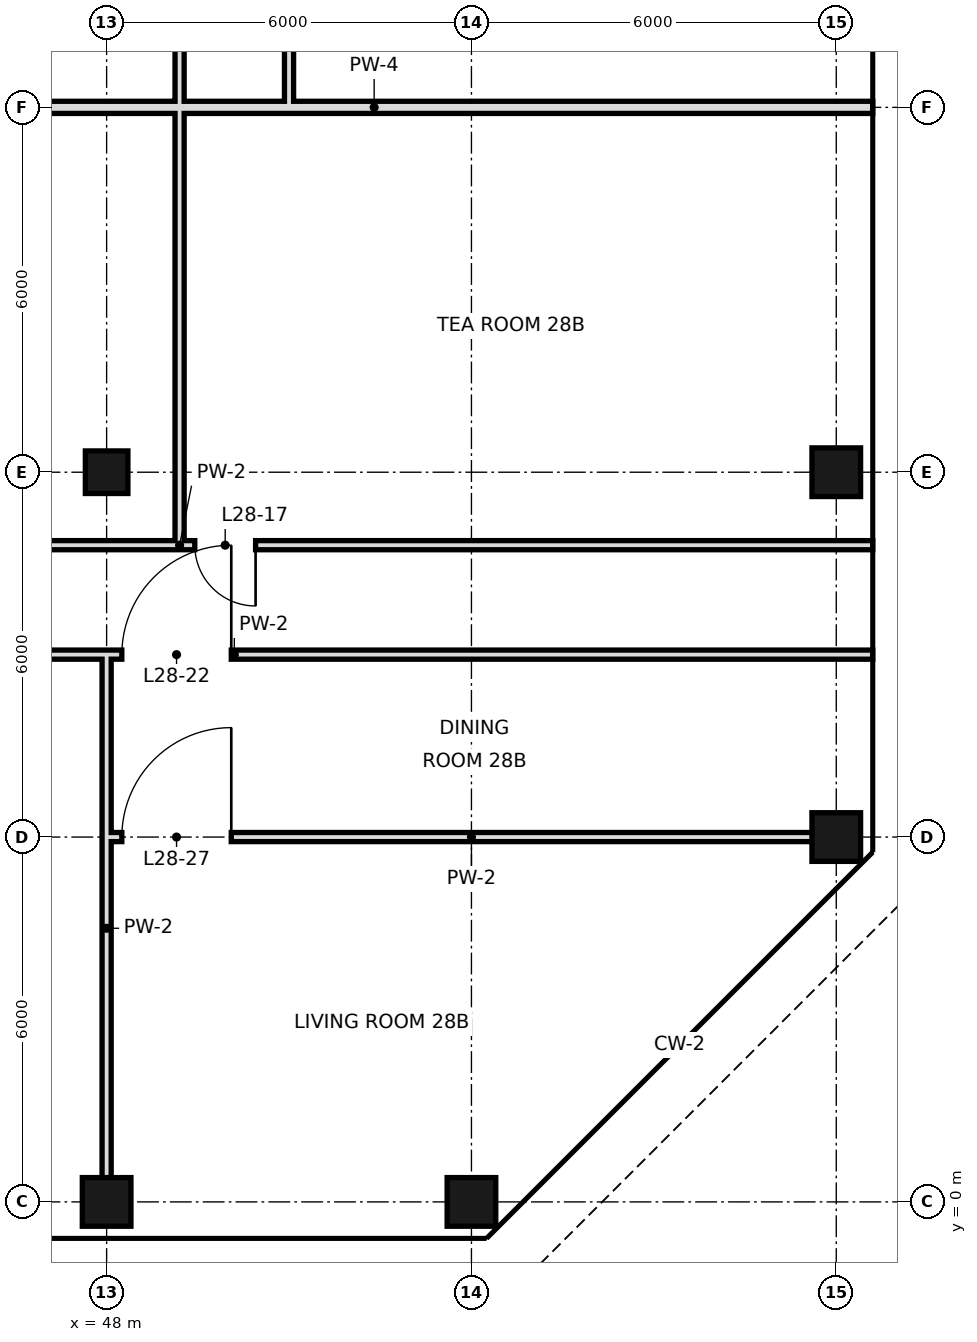
"""IFC4 building model, lengths in metres.
Left out: names, types, materials, properties, quantities, classifications, styles, units other than length and angle.
Written with IfcOpenShell. Run it as: python <this file> out.ifc"""

import sys

from ifc_helpers import new_model, si_unit, direction, frame, frame_2d, origin, origin_2d, place, context, subcontext, project, spatial, rectangle, hollow_rectangle, extrude, element, fill, save


model = new_model("IFC4")
c1 = context("Model", 3, precision=1e-05, world=origin(), true_north=direction((0.0, 1.0)))
c2 = subcontext(c1, "Body", "Model", "MODEL_VIEW")
j1 = project(units=[si_unit("LENGTHUNIT", "METRE"), si_unit("PLANEANGLEUNIT", "RADIAN")], contexts=[c1])
p1 = place(None, origin())
s1 = spatial("IfcSite", under=j1, at=p1, CompositionType="ELEMENT")
p2 = place(p1, origin())
s2 = spatial("IfcBuilding", under=s1, at=p2, CompositionType="ELEMENT")
p3 = place(p2, frame((0.0, 0.0, 126.8)))
s3 = spatial("IfcBuildingStorey", under=s2, at=p3, CompositionType="ELEMENT", Elevation=126.8)
p4 = place(p3, frame((48.0, 0.0, 0.0), z_axis=(0.0, 0.0, 1.0), x_axis=(1.0, 0.0, 0.0)))
e1 = element("IfcColumn", 1, at=p4, inside=s3, PredefinedType="COLUMN", context=c2, shape_type="SweptSolid", body=[
    extrude(hollow_rectangle(XDim=0.8, YDim=0.8, WallThickness=0.04, at=origin_2d()), origin(), (0.0, 0.0, 1.0), 3.6),
])
p5 = place(p3, frame((48.0, 12.0, 0.0), z_axis=(0.0, 0.0, 1.0), x_axis=(1.0, 0.0, 0.0)))
e2 = element("IfcColumn", 2, at=p5, inside=s3, PredefinedType="COLUMN", context=c2, shape_type="SweptSolid", body=[
    extrude(hollow_rectangle(XDim=0.7, YDim=0.7, WallThickness=0.036, at=origin_2d()), origin(), (0.0, 0.0, 1.0), 3.6),
])
for number, where, z_axis, x_axis in (
    (3, (54.0, 0.0, 0.0), (0.0, 0.0, 1.0), (1.0, 0.0, 0.0)),
    (4, (60.0, 6.0, 0.0), (0.0, 0.0, 1.0), (1.0, 0.0, 0.0)),
    (5, (60.0, 12.0, 0.0), (0.0, 0.0, 1.0), (1.0, 0.0, 0.0)),
):
    element("IfcColumn", number, at=place(p3, frame(where, z_axis=z_axis, x_axis=x_axis)), inside=s3, PredefinedType="COLUMN", context=c2, shape_type="SweptSolid", body=[
        extrude(hollow_rectangle(XDim=0.8, YDim=0.8, WallThickness=0.04, at=origin_2d()), origin(), (0.0, 0.0, 1.0), 3.6),
    ])
p6 = place(p3, frame((48.0, 0.0, 0.0), z_axis=(0.0, 0.0, 1.0), x_axis=(0.0, 1.0, 0.0)))
e6 = element("IfcWall", 6, at=p6, inside=s3, PredefinedType="PARTITIONING", context=c2, shape_type="SweptSolid", body=[
    extrude(rectangle(XDim=9.0, YDim=0.15, at=frame_2d((4.5, 0.0))), origin(), (0.0, 0.0, 1.0), 2.72),
])
p7 = place(p3, frame((49.2, 10.8, 0.0), z_axis=(0.0, 0.0, 1.0), x_axis=(0.0, 1.0, 0.0)))
e7 = element("IfcWall", 7, at=p7, inside=s3, PredefinedType="PARTITIONING", context=c2, shape_type="SweptSolid", body=[
    extrude(rectangle(XDim=20.4, YDim=0.15, at=frame_2d((10.2, 0.0))), origin(), (0.0, 0.0, 1.0), 3.42),
])
p8 = place(p7, frame((17.68, 0.0, 0.0)))
e8 = element("IfcOpeningElement", 8, at=p8, cuts=e7, PredefinedType="OPENING", context=c2, shape_type="SweptSolid", body=[
    extrude(rectangle(XDim=1.0, YDim=2.4, at=frame_2d((0.5, 1.2))), frame((0.0, 0.085, 0.0), z_axis=(0.0, -1.0, 0.0), x_axis=(1.0, 0.0, 0.0)), (0.0, 0.0, 1.0), 0.17),
])
p9 = place(p7, frame((9.88, 0.0, 0.0)))
e9 = element("IfcOpeningElement", 9, at=p9, cuts=e7, PredefinedType="OPENING", context=c2, shape_type="SweptSolid", body=[
    extrude(rectangle(XDim=1.0, YDim=2.4, at=frame_2d((0.5, 1.2))), frame((0.0, 0.085, 0.0), z_axis=(0.0, -1.0, 0.0), x_axis=(1.0, 0.0, 0.0)), (0.0, 0.0, 1.0), 0.17),
])
p10 = place(p3, frame((51.0, 18.0, 0.0), z_axis=(0.0, 0.0, 1.0), x_axis=(0.0, 1.0, 0.0)))
e10 = element("IfcWall", 10, at=p10, inside=s3, PredefinedType="PARTITIONING", context=c2, shape_type="SweptSolid", body=[
    extrude(rectangle(XDim=12.0, YDim=0.15, at=frame_2d((6.0, 0.0))), origin(), (0.0, 0.0, 1.0), 3.42),
])
p11 = place(p10, frame((2.84, 0.0, 0.0)))
e11 = element("IfcOpeningElement", 11, at=p11, cuts=e10, PredefinedType="OPENING", context=c2, shape_type="SweptSolid", body=[
    extrude(rectangle(XDim=1.8, YDim=2.4, at=frame_2d((0.9, 1.2))), frame((0.0, 0.085, 0.0), z_axis=(0.0, -1.0, 0.0), x_axis=(1.0, 0.0, 0.0)), (0.0, 0.0, 1.0), 0.17),
])
p12 = place(p10, frame((8.1, 0.0, 0.0)))
e12 = element("IfcOpeningElement", 12, at=p12, cuts=e10, PredefinedType="OPENING", context=c2, shape_type="SweptSolid", body=[
    extrude(rectangle(XDim=1.8, YDim=2.4, at=frame_2d((0.9, 1.2))), frame((0.0, 0.085, 0.0), z_axis=(0.0, -1.0, 0.0), x_axis=(1.0, 0.0, 0.0)), (0.0, 0.0, 1.0), 0.17),
])
p13 = place(p3, frame((37.8, 10.8, 0.0), z_axis=(0.0, 0.0, 1.0), x_axis=(1.0, 0.0, 0.0)))
e13 = element("IfcWall", 13, at=p13, inside=s3, PredefinedType="PARTITIONING", context=c2, shape_type="SweptSolid", body=[
    extrude(rectangle(XDim=22.8, YDim=0.15, at=frame_2d((11.4, 0.0))), origin(), (0.0, 0.0, 1.0), 3.42),
])
p14 = place(p13, frame((5.2, 0.0, 0.0)))
e14 = element("IfcOpeningElement", 14, at=p14, cuts=e13, PredefinedType="OPENING", context=c2, shape_type="SweptSolid", body=[
    extrude(rectangle(XDim=1.0, YDim=2.4, at=frame_2d((0.5, 1.2))), frame((0.0, 0.085, 0.0), z_axis=(0.0, -1.0, 0.0), x_axis=(1.0, 0.0, 0.0)), (0.0, 0.0, 1.0), 0.17),
])
p15 = place(p13, frame((11.65, 0.0, 0.0)))
e15 = element("IfcOpeningElement", 15, at=p15, cuts=e13, PredefinedType="OPENING", context=c2, shape_type="SweptSolid", body=[
    extrude(rectangle(XDim=1.0, YDim=2.4, at=frame_2d((0.5, 1.2))), frame((0.0, 0.085, 0.0), z_axis=(0.0, -1.0, 0.0), x_axis=(1.0, 0.0, 0.0)), (0.0, 0.0, 1.0), 0.17),
])
p16 = place(p3, frame((44.9, 18.0, 0.0), z_axis=(0.0, 0.0, 1.0), x_axis=(1.0, 0.0, 0.0)))
e16 = element("IfcWall", 16, at=p16, inside=s3, PredefinedType="SOLIDWALL", context=c2, shape_type="SweptSolid", body=[
    extrude(rectangle(XDim=15.7, YDim=0.2, at=frame_2d((7.85, 0.0))), origin(), (0.0, 0.0, 1.0), 2.72),
])
p17 = place(p3, frame((48.0, 6.0, 0.0), z_axis=(0.0, 0.0, 1.0), x_axis=(1.0, 0.0, 0.0)))
e17 = element("IfcWall", 17, at=p17, inside=s3, PredefinedType="PARTITIONING", context=c2, shape_type="SweptSolid", body=[
    extrude(rectangle(XDim=12.0, YDim=0.15, at=frame_2d((6.0, 0.0))), origin(), (0.0, 0.0, 1.0), 2.72),
])
p18 = place(p17, frame((0.25, 0.0, 0.0)))
e18 = element("IfcOpeningElement", 18, at=p18, cuts=e17, PredefinedType="OPENING", context=c2, shape_type="SweptSolid", body=[
    extrude(rectangle(XDim=1.8, YDim=2.4, at=frame_2d((0.9, 1.2))), frame((0.0, 0.085, 0.0), z_axis=(0.0, -1.0, 0.0), x_axis=(1.0, 0.0, 0.0)), (0.0, 0.0, 1.0), 0.17),
])
p19 = place(p3, frame((39.6, 9.0, 0.0), z_axis=(0.0, 0.0, 1.0), x_axis=(1.0, 0.0, 0.0)))
e19 = element("IfcWall", 19, at=p19, inside=s3, PredefinedType="PARTITIONING", context=c2, shape_type="SweptSolid", body=[
    extrude(rectangle(XDim=21.0, YDim=0.15, at=frame_2d((10.5, 0.0))), origin(), (0.0, 0.0, 1.0), 3.42),
])
p20 = place(p19, frame((0.88, 0.0, 0.0)))
e20 = element("IfcOpeningElement", 20, at=p20, cuts=e19, PredefinedType="OPENING", context=c2, shape_type="SweptSolid", body=[
    extrude(rectangle(XDim=1.0, YDim=2.4, at=frame_2d((0.5, 1.2))), frame((0.0, 0.085, 0.0), z_axis=(0.0, -1.0, 0.0), x_axis=(1.0, 0.0, 0.0)), (0.0, 0.0, 1.0), 0.17),
])
p21 = place(p19, frame((4.9, 0.0, 0.0)))
e21 = element("IfcOpeningElement", 21, at=p21, cuts=e19, PredefinedType="OPENING", context=c2, shape_type="SweptSolid", body=[
    extrude(rectangle(XDim=1.0, YDim=2.4, at=frame_2d((0.5, 1.2))), frame((0.0, 0.085, 0.0), z_axis=(0.0, -1.0, 0.0), x_axis=(1.0, 0.0, 0.0)), (0.0, 0.0, 1.0), 0.17),
])
p22 = place(p19, frame((8.65, 0.0, 0.0)))
e22 = element("IfcOpeningElement", 22, at=p22, cuts=e19, PredefinedType="OPENING", context=c2, shape_type="SweptSolid", body=[
    extrude(rectangle(XDim=1.8, YDim=2.4, at=frame_2d((0.9, 1.2))), frame((0.0, 0.085, 0.0), z_axis=(0.0, -1.0, 0.0), x_axis=(1.0, 0.0, 0.0)), (0.0, 0.0, 1.0), 0.17),
])
p23 = place(p15, origin())
e23 = element("IfcDoor", 23, at=p23, inside=s3, OperationType="SINGLE_SWING_RIGHT", PredefinedType="DOOR", context=c2, shape_type="SweptSolid", body=[
    extrude(rectangle(XDim=1.0, YDim=2.4, at=frame_2d((0.5, 1.2))), frame((0.0, 0.025, 0.0), z_axis=(0.0, -1.0, 0.0), x_axis=(1.0, 0.0, 0.0)), (0.0, 0.0, 1.0), 0.05),
])
fill(e15, e23)
p24 = place(p22, frame((1.8, 0.0, 0.0), z_axis=(0.0, 0.0, 1.0), x_axis=(-1.0, 0.0, 0.0)))
e24 = element("IfcDoor", 24, at=p24, inside=s3, OperationType="SINGLE_SWING_LEFT", PredefinedType="DOOR", context=c2, shape_type="SweptSolid", body=[
    extrude(rectangle(XDim=1.8, YDim=2.4, at=frame_2d((0.9, 1.2))), frame((0.0, 0.025, 0.0), z_axis=(0.0, -1.0, 0.0), x_axis=(1.0, 0.0, 0.0)), (0.0, 0.0, 1.0), 0.05),
])
fill(e22, e24)
p25 = place(p18, frame((1.8, 0.0, 0.0), z_axis=(0.0, 0.0, 1.0), x_axis=(-1.0, 0.0, 0.0)))
e25 = element("IfcDoor", 25, at=p25, inside=s3, OperationType="SINGLE_SWING_LEFT", PredefinedType="DOOR", context=c2, shape_type="SweptSolid", body=[
    extrude(rectangle(XDim=1.8, YDim=2.4, at=frame_2d((0.9, 1.2))), frame((0.0, 0.025, 0.0), z_axis=(0.0, -1.0, 0.0), x_axis=(1.0, 0.0, 0.0)), (0.0, 0.0, 1.0), 0.05),
])
fill(e18, e25)
save(model, sys.argv[1])
